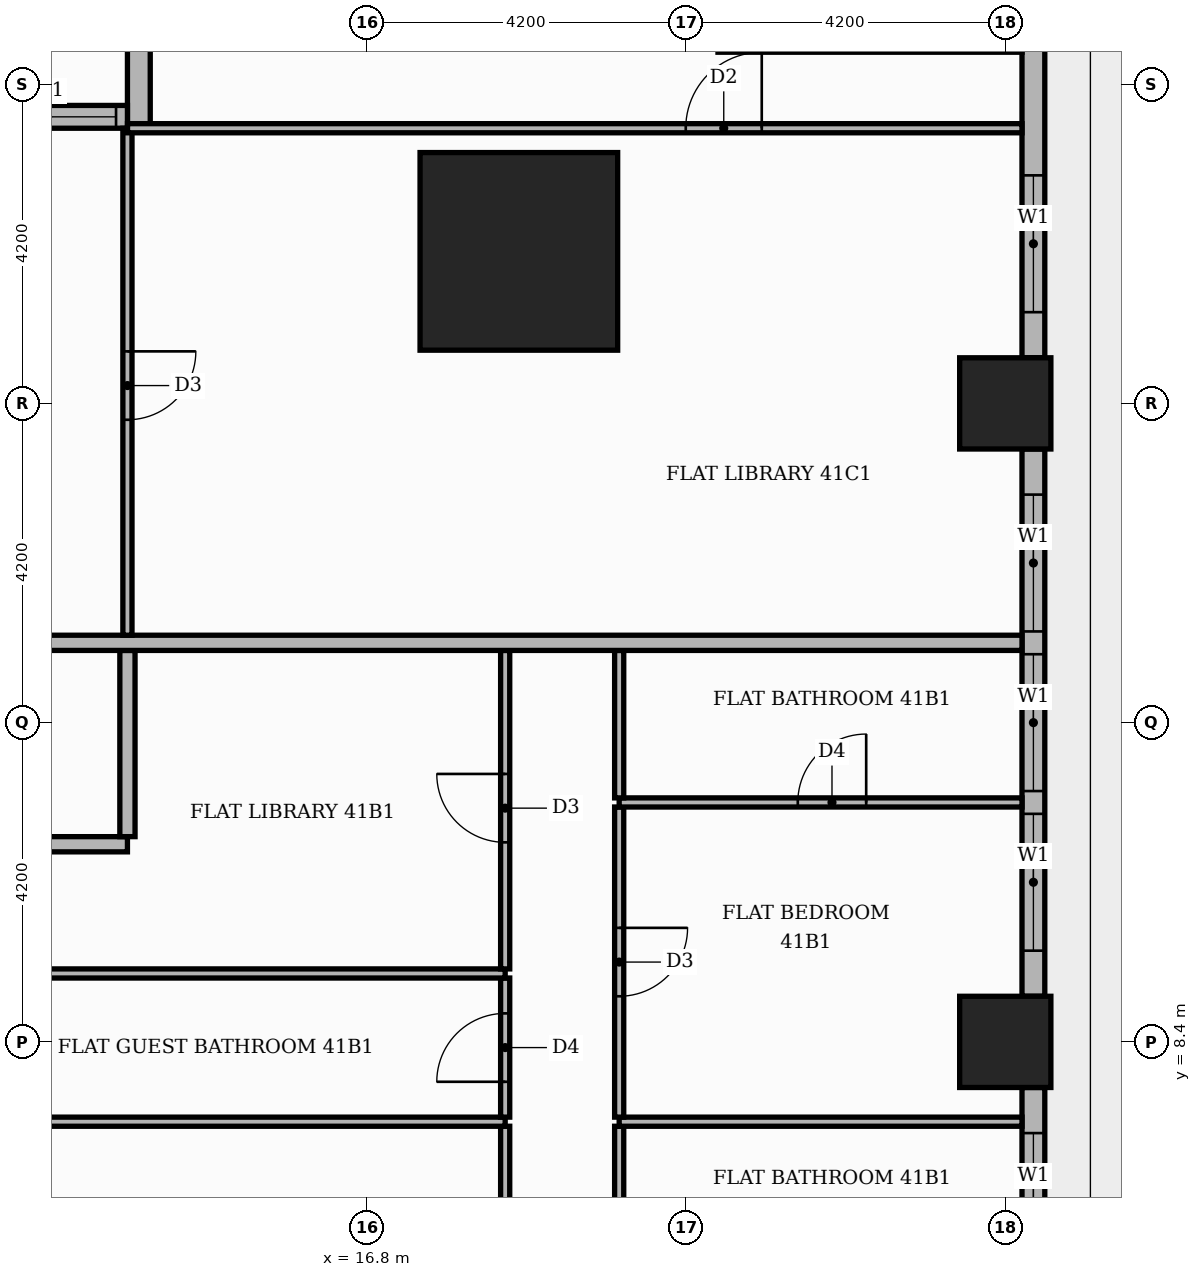
"""IFC4 building model, lengths in metres.
Left out: names, types, materials, properties, quantities, classifications, styles, units other than length and angle.
Written with IfcOpenShell. Run it as: python <this file> out.ifc"""

import sys

from ifc_helpers import new_model, si_unit, direction, frame, frame_2d, origin, origin_2d, place, context, subcontext, project, spatial, rectangle, extrude, element, fill, save


model = new_model("IFC4")
c1 = context("Model", 3, precision=1e-05, world=origin(), true_north=direction((0.0, 1.0)))
c2 = subcontext(c1, "Body", "Model", "MODEL_VIEW")
j1 = project(units=[si_unit("LENGTHUNIT", "METRE"), si_unit("PLANEANGLEUNIT", "RADIAN")], contexts=[c1])
p1 = place(None, origin())
s1 = spatial("IfcSite", under=j1, at=p1, CompositionType="ELEMENT")
p2 = place(p1, origin())
s2 = spatial("IfcBuilding", under=s1, at=p2, CompositionType="ELEMENT")
p3 = place(p2, frame((0.0, 0.0, 172.8)))
s3 = spatial("IfcBuildingStorey", under=s2, at=p3, CompositionType="ELEMENT", Elevation=172.8)
p4 = place(p3, frame((18.8, 18.8, 0.0), z_axis=(0.0, 0.0, 1.0), x_axis=(1.0, 0.0, 0.0)))
e1 = element("IfcColumn", 1, at=p4, inside=s3, PredefinedType="COLUMN", context=c2, shape_type="SweptSolid", body=[
    extrude(rectangle(XDim=2.6, YDim=2.6, at=origin_2d()), origin(), (0.0, 0.0, 1.0), 3.9),
])
for number, where, z_axis, x_axis in (
    (2, (25.2, 8.4, 0.0), (0.0, 0.0, 1.0), (1.0, 0.0, 0.0)),
    (3, (25.2, 16.8, 0.0), (0.0, 0.0, 1.0), (1.0, 0.0, 0.0)),
):
    element("IfcColumn", number, at=place(p3, frame(where, z_axis=z_axis, x_axis=x_axis)), inside=s3, PredefinedType="COLUMN", context=c2, shape_type="SweptSolid", body=[
        extrude(rectangle(XDim=1.2, YDim=1.2, at=origin_2d()), origin(), (0.0, 0.0, 1.0), 3.9),
    ])
p5 = place(p3, frame((25.57, 0.6, 0.0), z_axis=(0.0, 0.0, 1.0), x_axis=(0.0, 1.0, 0.0)))
e4 = element("IfcWall", 4, at=p5, inside=s3, PredefinedType="STANDARD", context=c2, shape_type="SweptSolid", body=[
    extrude(rectangle(XDim=7.2, YDim=0.3, at=frame_2d((3.6, 0.0))), origin(), (0.0, 0.0, 1.0), 3.48),
])
p6 = place(p5, frame((0.6, 0.0, 0.9)))
e5 = element("IfcOpeningElement", 5, at=p6, cuts=e4, PredefinedType="OPENING", context=c2, shape_type="SweptSolid", body=[
    extrude(rectangle(XDim=3.9, YDim=2.1, at=frame_2d((1.95, 1.05))), frame((0.0, 0.16, 0.0), z_axis=(0.0, -1.0, 0.0), x_axis=(1.0, 0.0, 0.0)), (0.0, 0.0, 1.0), 0.32),
])
p7 = place(p5, frame((4.8, 0.0, 0.9)))
e6 = element("IfcOpeningElement", 6, at=p7, cuts=e4, PredefinedType="OPENING", context=c2, shape_type="SweptSolid", body=[
    extrude(rectangle(XDim=1.8, YDim=2.1, at=frame_2d((0.9, 1.05))), frame((0.0, 0.16, 0.0), z_axis=(0.0, -1.0, 0.0), x_axis=(1.0, 0.0, 0.0)), (0.0, 0.0, 1.0), 0.32),
])
p8 = place(p3, frame((25.57, 9.0, 0.0), z_axis=(0.0, 0.0, 1.0), x_axis=(0.0, 1.0, 0.0)))
e7 = element("IfcWall", 7, at=p8, inside=s3, PredefinedType="STANDARD", context=c2, shape_type="SweptSolid", body=[
    extrude(rectangle(XDim=7.2, YDim=0.3, at=frame_2d((3.6, 0.0))), origin(), (0.0, 0.0, 1.0), 3.48),
])
p9 = place(p8, frame((0.6, 0.0, 0.9)))
e8 = element("IfcOpeningElement", 8, at=p9, cuts=e7, PredefinedType="OPENING", context=c2, shape_type="SweptSolid", body=[
    extrude(rectangle(XDim=1.8, YDim=2.1, at=frame_2d((0.9, 1.05))), frame((0.0, 0.16, 0.0), z_axis=(0.0, -1.0, 0.0), x_axis=(1.0, 0.0, 0.0)), (0.0, 0.0, 1.0), 0.32),
])
p10 = place(p8, frame((2.7, 0.0, 0.9)))
e9 = element("IfcOpeningElement", 9, at=p10, cuts=e7, PredefinedType="OPENING", context=c2, shape_type="SweptSolid", body=[
    extrude(rectangle(XDim=1.8, YDim=2.1, at=frame_2d((0.9, 1.05))), frame((0.0, 0.16, 0.0), z_axis=(0.0, -1.0, 0.0), x_axis=(1.0, 0.0, 0.0)), (0.0, 0.0, 1.0), 0.32),
])
p11 = place(p8, frame((4.8, 0.0, 0.9)))
e10 = element("IfcOpeningElement", 10, at=p11, cuts=e7, PredefinedType="OPENING", context=c2, shape_type="SweptSolid", body=[
    extrude(rectangle(XDim=1.8, YDim=2.1, at=frame_2d((0.9, 1.05))), frame((0.0, 0.16, 0.0), z_axis=(0.0, -1.0, 0.0), x_axis=(1.0, 0.0, 0.0)), (0.0, 0.0, 1.0), 0.32),
])
p12 = place(p3, frame((25.57, 17.4, 0.0), z_axis=(0.0, 0.0, 1.0), x_axis=(0.0, 1.0, 0.0)))
e11 = element("IfcWall", 11, at=p12, inside=s3, PredefinedType="STANDARD", context=c2, shape_type="SweptSolid", body=[
    extrude(rectangle(XDim=4.32, YDim=0.3, at=frame_2d((2.16, 0.0))), origin(), (0.0, 0.0, 1.0), 3.48),
])
p13 = place(p12, frame((0.6, 0.0, 0.9)))
e12 = element("IfcOpeningElement", 12, at=p13, cuts=e11, PredefinedType="OPENING", context=c2, shape_type="SweptSolid", body=[
    extrude(rectangle(XDim=1.8, YDim=2.1, at=frame_2d((0.9, 1.05))), frame((0.0, 0.16, 0.0), z_axis=(0.0, -1.0, 0.0), x_axis=(1.0, 0.0, 0.0)), (0.0, 0.0, 1.0), 0.32),
])
p14 = place(p3, frame((13.8, 25.42, 0.0), z_axis=(0.0, 0.0, 1.0), x_axis=(0.0, -1.0, 0.0)))
e13 = element("IfcWall", 13, at=p14, inside=s3, PredefinedType="STANDARD", context=c2, shape_type="SweptSolid", body=[
    extrude(rectangle(XDim=5.0, YDim=0.3, at=frame_2d((2.5, 0.0))), origin(), (0.0, 0.0, 1.0), 3.48),
])
p15 = place(p14, frame((1.42, 0.0, 0.0)))
e14 = element("IfcOpeningElement", 14, at=p15, cuts=e13, PredefinedType="OPENING", context=c2, shape_type="SweptSolid", body=[
    extrude(rectangle(XDim=1.8, YDim=2.4, at=frame_2d((0.9, 1.2))), frame((0.0, 0.16, 0.0), z_axis=(0.0, -1.0, 0.0), x_axis=(1.0, 0.0, 0.0)), (0.0, 0.0, 1.0), 0.32),
])
p16 = place(p3, frame((13.65, 20.57, 0.0), z_axis=(0.0, 0.0, 1.0), x_axis=(-1.0, 0.0, 0.0)))
e15 = element("IfcWall", 15, at=p16, inside=s3, PredefinedType="STANDARD", context=c2, shape_type="SweptSolid", body=[
    extrude(rectangle(XDim=27.6, YDim=0.3, at=frame_2d((13.8, 0.0))), origin(), (0.0, 0.0, 1.0), 3.48),
])
p17 = place(p16, frame((0.15, 0.0, 0.9)))
e16 = element("IfcOpeningElement", 16, at=p17, cuts=e15, PredefinedType="OPENING", context=c2, shape_type="SweptSolid", body=[
    extrude(rectangle(XDim=1.8, YDim=2.1, at=frame_2d((0.9, 1.05))), frame((0.0, 0.16, 0.0), z_axis=(0.0, -1.0, 0.0), x_axis=(1.0, 0.0, 0.0)), (0.0, 0.0, 1.0), 0.32),
])
p18 = place(p16, frame((2.25, 0.0, 0.9)))
e17 = element("IfcOpeningElement", 17, at=p18, cuts=e15, PredefinedType="OPENING", context=c2, shape_type="SweptSolid", body=[
    extrude(rectangle(XDim=6.0, YDim=2.1, at=frame_2d((3.0, 1.05))), frame((0.0, 0.16, 0.0), z_axis=(0.0, -1.0, 0.0), x_axis=(1.0, 0.0, 0.0)), (0.0, 0.0, 1.0), 0.32),
])
p19 = place(p16, frame((8.55, 0.0, 0.9)))
e18 = element("IfcOpeningElement", 18, at=p19, cuts=e15, PredefinedType="OPENING", context=c2, shape_type="SweptSolid", body=[
    extrude(rectangle(XDim=6.0, YDim=2.1, at=frame_2d((3.0, 1.05))), frame((0.0, 0.16, 0.0), z_axis=(0.0, -1.0, 0.0), x_axis=(1.0, 0.0, 0.0)), (0.0, 0.0, 1.0), 0.32),
])
p20 = place(p16, frame((14.85, 0.0, 0.9)))
e19 = element("IfcOpeningElement", 19, at=p20, cuts=e15, PredefinedType="OPENING", context=c2, shape_type="SweptSolid", body=[
    extrude(rectangle(XDim=6.0, YDim=2.1, at=frame_2d((3.0, 1.05))), frame((0.0, 0.16, 0.0), z_axis=(0.0, -1.0, 0.0), x_axis=(1.0, 0.0, 0.0)), (0.0, 0.0, 1.0), 0.32),
])
p21 = place(p16, frame((21.15, 0.0, 0.9)))
e20 = element("IfcOpeningElement", 20, at=p21, cuts=e15, PredefinedType="OPENING", context=c2, shape_type="SweptSolid", body=[
    extrude(rectangle(XDim=6.0, YDim=2.1, at=frame_2d((3.0, 1.05))), frame((0.0, 0.16, 0.0), z_axis=(0.0, -1.0, 0.0), x_axis=(1.0, 0.0, 0.0)), (0.0, 0.0, 1.0), 0.32),
])
p22 = place(p3, frame((18.62, 3.21, 0.0), z_axis=(0.0, 0.0, 1.0), x_axis=(0.0, 1.0, 0.0)))
e21 = element("IfcWall", 21, at=p22, inside=s3, PredefinedType="PARTITIONING", context=c2, shape_type="SweptSolid", body=[
    extrude(rectangle(XDim=4.08, YDim=0.12, at=frame_2d((2.04, 0.0))), origin(), (0.0, 0.0, 1.0), 3.48),
])
p23 = place(p22, frame((1.59, 0.0, 0.0)))
e22 = element("IfcOpeningElement", 22, at=p23, cuts=e21, PredefinedType="OPENING", context=c2, shape_type="SweptSolid", body=[
    extrude(rectangle(XDim=0.9, YDim=2.1, at=frame_2d((0.45, 1.05))), frame((0.0, 0.07, 0.0), z_axis=(0.0, -1.0, 0.0), x_axis=(1.0, 0.0, 0.0)), (0.0, 0.0, 1.0), 0.14),
])
p24 = place(p3, frame((20.12, 5.31, 0.0), z_axis=(0.0, 0.0, 1.0), x_axis=(0.0, 1.0, 0.0)))
e23 = element("IfcWall", 23, at=p24, inside=s3, PredefinedType="PARTITIONING", context=c2, shape_type="SweptSolid", body=[
    extrude(rectangle(XDim=1.98, YDim=0.12, at=frame_2d((0.99, 0.0))), origin(), (0.0, 0.0, 1.0), 3.48),
])
p25 = place(p3, frame((11.0, 7.35, 0.0), z_axis=(0.0, 0.0, 1.0), x_axis=(1.0, 0.0, 0.0)))
e24 = element("IfcWall", 24, at=p25, inside=s3, PredefinedType="PARTITIONING", context=c2, shape_type="SweptSolid", body=[
    extrude(rectangle(XDim=7.62, YDim=0.12, at=frame_2d((3.81, 0.0))), origin(), (0.0, 0.0, 1.0), 3.48),
])
p26 = place(p3, frame((20.12, 7.35, 0.0), z_axis=(0.0, 0.0, 1.0), x_axis=(1.0, 0.0, 0.0)))
e25 = element("IfcWall", 25, at=p26, inside=s3, PredefinedType="PARTITIONING", context=c2, shape_type="SweptSolid", body=[
    extrude(rectangle(XDim=5.3, YDim=0.12, at=frame_2d((2.65, 0.0))), origin(), (0.0, 0.0, 1.0), 3.48),
])
p27 = place(p3, frame((18.62, 7.41, 0.0), z_axis=(0.0, 0.0, 1.0), x_axis=(0.0, 1.0, 0.0)))
e26 = element("IfcWall", 26, at=p27, inside=s3, PredefinedType="PARTITIONING", context=c2, shape_type="SweptSolid", body=[
    extrude(rectangle(XDim=1.83, YDim=0.12, at=frame_2d((0.915, 0.0))), origin(), (0.0, 0.0, 1.0), 3.48),
])
p28 = place(p27, frame((0.465, 0.0, 0.0)))
e27 = element("IfcOpeningElement", 27, at=p28, cuts=e26, PredefinedType="OPENING", context=c2, shape_type="SweptSolid", body=[
    extrude(rectangle(XDim=0.9, YDim=2.1, at=frame_2d((0.45, 1.05))), frame((0.0, 0.07, 0.0), z_axis=(0.0, -1.0, 0.0), x_axis=(1.0, 0.0, 0.0)), (0.0, 0.0, 1.0), 0.14),
])
p29 = place(p3, frame((20.12, 7.41, 0.0), z_axis=(0.0, 0.0, 1.0), x_axis=(0.0, 1.0, 0.0)))
e28 = element("IfcWall", 28, at=p29, inside=s3, PredefinedType="PARTITIONING", context=c2, shape_type="SweptSolid", body=[
    extrude(rectangle(XDim=4.08, YDim=0.12, at=frame_2d((2.04, 0.0))), origin(), (0.0, 0.0, 1.0), 3.48),
])
p30 = place(p29, frame((1.59, 0.0, 0.0)))
e29 = element("IfcOpeningElement", 29, at=p30, cuts=e28, PredefinedType="OPENING", context=c2, shape_type="SweptSolid", body=[
    extrude(rectangle(XDim=0.9, YDim=2.1, at=frame_2d((0.45, 1.05))), frame((0.0, 0.07, 0.0), z_axis=(0.0, -1.0, 0.0), x_axis=(1.0, 0.0, 0.0)), (0.0, 0.0, 1.0), 0.14),
])
p31 = place(p3, frame((11.0, 9.3, 0.0), z_axis=(0.0, 0.0, 1.0), x_axis=(1.0, 0.0, 0.0)))
e30 = element("IfcWall", 30, at=p31, inside=s3, PredefinedType="PARTITIONING", context=c2, shape_type="SweptSolid", body=[
    extrude(rectangle(XDim=7.62, YDim=0.12, at=frame_2d((3.81, 0.0))), origin(), (0.0, 0.0, 1.0), 3.48),
])
p32 = place(p3, frame((18.62, 9.36, 0.0), z_axis=(0.0, 0.0, 1.0), x_axis=(0.0, 1.0, 0.0)))
e31 = element("IfcWall", 31, at=p32, inside=s3, PredefinedType="PARTITIONING", context=c2, shape_type="SweptSolid", body=[
    extrude(rectangle(XDim=4.19, YDim=0.12, at=frame_2d((2.095, 0.0))), origin(), (0.0, 0.0, 1.0), 3.48),
])
p33 = place(p32, frame((1.665, 0.0, 0.0)))
e32 = element("IfcOpeningElement", 32, at=p33, cuts=e31, PredefinedType="OPENING", context=c2, shape_type="SweptSolid", body=[
    extrude(rectangle(XDim=0.9, YDim=2.1, at=frame_2d((0.45, 1.05))), frame((0.0, 0.07, 0.0), z_axis=(0.0, -1.0, 0.0), x_axis=(1.0, 0.0, 0.0)), (0.0, 0.0, 1.0), 0.14),
])
p34 = place(p3, frame((11.0, 11.0, 0.0), z_axis=(0.0, 0.0, 1.0), x_axis=(1.0, 0.0, 0.0)))
e33 = element("IfcWall", 33, at=p34, inside=s3, PredefinedType="PARTITIONING", context=c2, shape_type="SweptSolid", body=[
    extrude(rectangle(XDim=2.65, YDim=0.2, at=frame_2d((1.325, 0.0))), origin(), (0.0, 0.0, 1.0), 3.48),
])
p35 = place(p3, frame((13.65, 11.1, 0.0), z_axis=(0.0, 0.0, 1.0), x_axis=(0.0, 1.0, 0.0)))
e34 = element("IfcWall", 34, at=p35, inside=s3, PredefinedType="PARTITIONING", context=c2, shape_type="SweptSolid", body=[
    extrude(rectangle(XDim=2.45, YDim=0.2, at=frame_2d((1.225, 0.0))), origin(), (0.0, 0.0, 1.0), 3.48),
])
p36 = place(p3, frame((20.12, 11.55, 0.0), z_axis=(0.0, 0.0, 1.0), x_axis=(1.0, 0.0, 0.0)))
e35 = element("IfcWall", 35, at=p36, inside=s3, PredefinedType="PARTITIONING", context=c2, shape_type="SweptSolid", body=[
    extrude(rectangle(XDim=5.3, YDim=0.12, at=frame_2d((2.65, 0.0))), origin(), (0.0, 0.0, 1.0), 3.48),
])
p37 = place(p36, frame((2.35, 0.0, 0.0)))
e36 = element("IfcOpeningElement", 36, at=p37, cuts=e35, PredefinedType="OPENING", context=c2, shape_type="SweptSolid", body=[
    extrude(rectangle(XDim=0.9, YDim=2.1, at=frame_2d((0.45, 1.05))), frame((0.0, 0.07, 0.0), z_axis=(0.0, -1.0, 0.0), x_axis=(1.0, 0.0, 0.0)), (0.0, 0.0, 1.0), 0.14),
])
p38 = place(p3, frame((20.12, 11.61, 0.0), z_axis=(0.0, 0.0, 1.0), x_axis=(0.0, 1.0, 0.0)))
e37 = element("IfcWall", 37, at=p38, inside=s3, PredefinedType="PARTITIONING", context=c2, shape_type="SweptSolid", body=[
    extrude(rectangle(XDim=1.94, YDim=0.12, at=frame_2d((0.97, 0.0))), origin(), (0.0, 0.0, 1.0), 3.48),
])
p39 = place(p3, frame((-13.65, 13.65, 0.0), z_axis=(0.0, 0.0, 1.0), x_axis=(1.0, 0.0, 0.0)))
e38 = element("IfcWall", 38, at=p39, inside=s3, PredefinedType="PARTITIONING", context=c2, shape_type="SweptSolid", body=[
    extrude(rectangle(XDim=39.07, YDim=0.2, at=frame_2d((19.535, 0.0))), origin(), (0.0, 0.0, 1.0), 3.48),
])
p40 = place(p39, frame((23.6, 0.0, 0.0)))
e39 = element("IfcOpeningElement", 39, at=p40, cuts=e38, PredefinedType="OPENING", context=c2, shape_type="SweptSolid", body=[
    extrude(rectangle(XDim=1.1, YDim=2.4, at=frame_2d((0.55, 1.2))), frame((0.0, 0.11, 0.0), z_axis=(0.0, -1.0, 0.0), x_axis=(1.0, 0.0, 0.0)), (0.0, 0.0, 1.0), 0.22),
])
p41 = place(p3, frame((13.65, 13.75, 0.0), z_axis=(0.0, 0.0, 1.0), x_axis=(0.0, 1.0, 0.0)))
e40 = element("IfcWall", 40, at=p41, inside=s3, PredefinedType="PARTITIONING", context=c2, shape_type="SweptSolid", body=[
    extrude(rectangle(XDim=6.669, YDim=0.12, at=frame_2d((3.334, 0.0))), origin(), (0.0, 0.0, 1.0), 3.48),
])
p42 = place(p41, frame((2.834, 0.0, 0.0)))
e41 = element("IfcOpeningElement", 41, at=p42, cuts=e40, PredefinedType="OPENING", context=c2, shape_type="SweptSolid", body=[
    extrude(rectangle(XDim=0.9, YDim=2.1, at=frame_2d((0.45, 1.05))), frame((0.0, 0.07, 0.0), z_axis=(0.0, -1.0, 0.0), x_axis=(1.0, 0.0, 0.0)), (0.0, 0.0, 1.0), 0.14),
])
p43 = place(p3, frame((13.651, 20.42, 0.0), z_axis=(0.0, 0.0, 1.0), x_axis=(1.0, 0.0, 0.0)))
e42 = element("IfcWall", 42, at=p43, inside=s3, PredefinedType="PARTITIONING", context=c2, shape_type="SweptSolid", body=[
    extrude(rectangle(XDim=11.769, YDim=0.12, at=frame_2d((5.885, 0.0))), origin(), (0.0, 0.0, 1.0), 3.48),
])
p44 = place(p43, frame((7.345, 0.0, 0.0)))
e43 = element("IfcOpeningElement", 43, at=p44, cuts=e42, PredefinedType="OPENING", context=c2, shape_type="SweptSolid", body=[
    extrude(rectangle(XDim=1.0, YDim=2.1, at=frame_2d((0.5, 1.05))), frame((0.0, 0.07, 0.0), z_axis=(0.0, -1.0, 0.0), x_axis=(1.0, 0.0, 0.0)), (0.0, 0.0, 1.0), 0.14),
])
p45 = place(p7, origin())
e44 = element("IfcWindow", 44, at=p45, inside=s3, PartitioningType="SINGLE_PANEL", PredefinedType="WINDOW", context=c2, shape_type="SweptSolid", body=[
    extrude(rectangle(XDim=1.8, YDim=2.1, at=frame_2d((0.9, 1.05))), frame((0.0, 0.03, 0.0), z_axis=(0.0, -1.0, 0.0), x_axis=(1.0, 0.0, 0.0)), (0.0, 0.0, 1.0), 0.06),
])
fill(e6, e44)
p46 = place(p9, origin())
e45 = element("IfcWindow", 45, at=p46, inside=s3, PartitioningType="SINGLE_PANEL", PredefinedType="WINDOW", context=c2, shape_type="SweptSolid", body=[
    extrude(rectangle(XDim=1.8, YDim=2.1, at=frame_2d((0.9, 1.05))), frame((0.0, 0.03, 0.0), z_axis=(0.0, -1.0, 0.0), x_axis=(1.0, 0.0, 0.0)), (0.0, 0.0, 1.0), 0.06),
])
fill(e8, e45)
p47 = place(p10, origin())
e46 = element("IfcWindow", 46, at=p47, inside=s3, PartitioningType="SINGLE_PANEL", PredefinedType="WINDOW", context=c2, shape_type="SweptSolid", body=[
    extrude(rectangle(XDim=1.8, YDim=2.1, at=frame_2d((0.9, 1.05))), frame((0.0, 0.03, 0.0), z_axis=(0.0, -1.0, 0.0), x_axis=(1.0, 0.0, 0.0)), (0.0, 0.0, 1.0), 0.06),
])
fill(e9, e46)
p48 = place(p11, origin())
e47 = element("IfcWindow", 47, at=p48, inside=s3, PartitioningType="SINGLE_PANEL", PredefinedType="WINDOW", context=c2, shape_type="SweptSolid", body=[
    extrude(rectangle(XDim=1.8, YDim=2.1, at=frame_2d((0.9, 1.05))), frame((0.0, 0.03, 0.0), z_axis=(0.0, -1.0, 0.0), x_axis=(1.0, 0.0, 0.0)), (0.0, 0.0, 1.0), 0.06),
])
fill(e10, e47)
p49 = place(p13, origin())
e48 = element("IfcWindow", 48, at=p49, inside=s3, PartitioningType="SINGLE_PANEL", PredefinedType="WINDOW", context=c2, shape_type="SweptSolid", body=[
    extrude(rectangle(XDim=1.8, YDim=2.1, at=frame_2d((0.9, 1.05))), frame((0.0, 0.03, 0.0), z_axis=(0.0, -1.0, 0.0), x_axis=(1.0, 0.0, 0.0)), (0.0, 0.0, 1.0), 0.06),
])
fill(e12, e48)
p50 = place(p17, origin())
e49 = element("IfcWindow", 49, at=p50, inside=s3, PartitioningType="SINGLE_PANEL", PredefinedType="WINDOW", context=c2, shape_type="SweptSolid", body=[
    extrude(rectangle(XDim=1.8, YDim=2.1, at=frame_2d((0.9, 1.05))), frame((0.0, 0.03, 0.0), z_axis=(0.0, -1.0, 0.0), x_axis=(1.0, 0.0, 0.0)), (0.0, 0.0, 1.0), 0.06),
])
fill(e16, e49)
p51 = place(p28, origin())
e50 = element("IfcDoor", 50, at=p51, inside=s3, OperationType="SINGLE_SWING_LEFT", PredefinedType="DOOR", context=c2, shape_type="SweptSolid", body=[
    extrude(rectangle(XDim=0.9, YDim=2.1, at=frame_2d((0.45, 1.05))), frame((0.0, 0.025, 0.0), z_axis=(0.0, -1.0, 0.0), x_axis=(1.0, 0.0, 0.0)), (0.0, 0.0, 1.0), 0.05),
])
fill(e27, e50)
p52 = place(p33, origin())
e51 = element("IfcDoor", 51, at=p52, inside=s3, OperationType="SINGLE_SWING_RIGHT", PredefinedType="DOOR", context=c2, shape_type="SweptSolid", body=[
    extrude(rectangle(XDim=0.9, YDim=2.1, at=frame_2d((0.45, 1.05))), frame((0.0, 0.025, 0.0), z_axis=(0.0, -1.0, 0.0), x_axis=(1.0, 0.0, 0.0)), (0.0, 0.0, 1.0), 0.05),
])
fill(e32, e51)
p53 = place(p30, frame((0.9, 0.0, 0.0), z_axis=(0.0, 0.0, 1.0), x_axis=(-1.0, 0.0, 0.0)))
e52 = element("IfcDoor", 52, at=p53, inside=s3, OperationType="SINGLE_SWING_RIGHT", PredefinedType="DOOR", context=c2, shape_type="SweptSolid", body=[
    extrude(rectangle(XDim=0.9, YDim=2.1, at=frame_2d((0.45, 1.05))), frame((0.0, 0.025, 0.0), z_axis=(0.0, -1.0, 0.0), x_axis=(1.0, 0.0, 0.0)), (0.0, 0.0, 1.0), 0.05),
])
fill(e29, e52)
p54 = place(p37, origin())
e53 = element("IfcDoor", 53, at=p54, inside=s3, OperationType="SINGLE_SWING_RIGHT", PredefinedType="DOOR", context=c2, shape_type="SweptSolid", body=[
    extrude(rectangle(XDim=0.9, YDim=2.1, at=frame_2d((0.45, 1.05))), frame((0.0, 0.025, 0.0), z_axis=(0.0, -1.0, 0.0), x_axis=(1.0, 0.0, 0.0)), (0.0, 0.0, 1.0), 0.05),
])
fill(e36, e53)
p55 = place(p42, frame((0.9, 0.0, 0.0), z_axis=(0.0, 0.0, 1.0), x_axis=(-1.0, 0.0, 0.0)))
e54 = element("IfcDoor", 54, at=p55, inside=s3, OperationType="SINGLE_SWING_RIGHT", PredefinedType="DOOR", context=c2, shape_type="SweptSolid", body=[
    extrude(rectangle(XDim=0.9, YDim=2.1, at=frame_2d((0.45, 1.05))), frame((0.0, 0.025, 0.0), z_axis=(0.0, -1.0, 0.0), x_axis=(1.0, 0.0, 0.0)), (0.0, 0.0, 1.0), 0.05),
])
fill(e41, e54)
p56 = place(p44, origin())
e55 = element("IfcDoor", 55, at=p56, inside=s3, OperationType="SINGLE_SWING_RIGHT", PredefinedType="DOOR", context=c2, shape_type="SweptSolid", body=[
    extrude(rectangle(XDim=1.0, YDim=2.1, at=frame_2d((0.5, 1.05))), frame((0.0, 0.025, 0.0), z_axis=(0.0, -1.0, 0.0), x_axis=(1.0, 0.0, 0.0)), (0.0, 0.0, 1.0), 0.05),
])
fill(e43, e55)
save(model, sys.argv[1])
